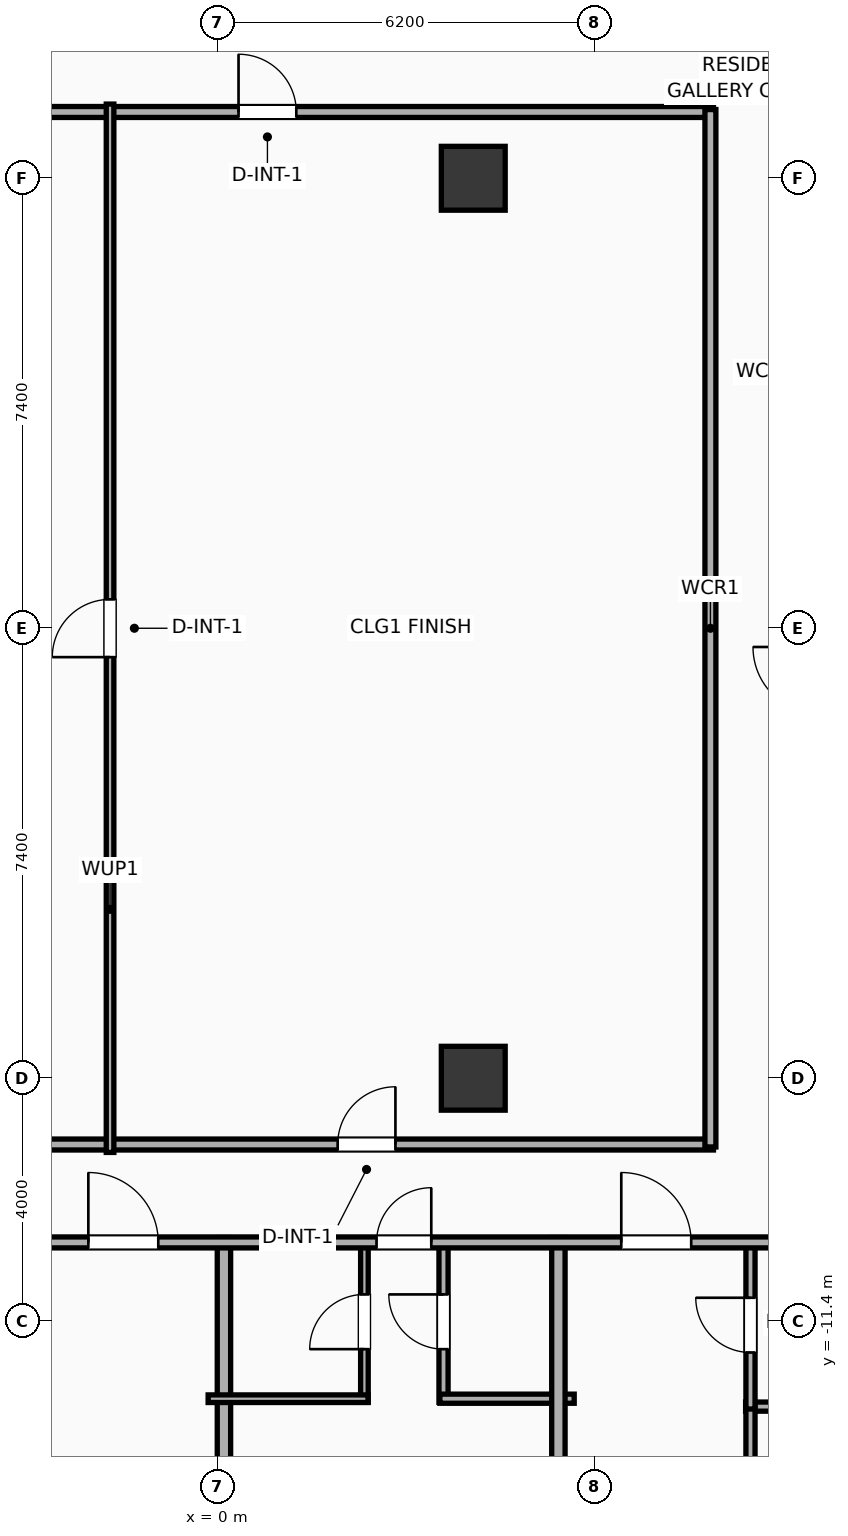
"""IFC4 building model, lengths in metres.
Left out: names, types, materials, properties, quantities, classifications, styles, units other than length and angle.
Written with IfcOpenShell. Run it as: python <this file> out.ifc"""

import sys

from ifc_helpers import new_model, si_unit, direction, frame, frame_2d, origin, origin_2d, place, context, subcontext, project, spatial, rectangle, extrude, element, fill, save


model = new_model("IFC4")
c1 = context("Model", 3, precision=1e-05, world=origin(), true_north=direction((0.0, 1.0)))
c2 = subcontext(c1, "Body", "Model", "MODEL_VIEW")
j1 = project(units=[si_unit("LENGTHUNIT", "METRE"), si_unit("PLANEANGLEUNIT", "RADIAN")], contexts=[c1])
p1 = place(None, origin())
s1 = spatial("IfcSite", under=j1, at=p1, CompositionType="ELEMENT")
p2 = place(p1, origin())
s2 = spatial("IfcBuilding", under=s1, at=p2, CompositionType="ELEMENT")
p3 = place(p2, frame((0.0, 0.0, 41.6)))
s3 = spatial("IfcBuildingStorey", under=s2, at=p3, CompositionType="ELEMENT", Elevation=41.6)
for number, where, z_axis, x_axis in (
    (1, (4.2, -7.4, 0.0), (0.0, 0.0, 1.0), (1.0, 0.0, 0.0)),
    (2, (4.2, 7.4, 0.0), (0.0, 0.0, 1.0), (1.0, 0.0, 0.0)),
):
    element("IfcColumn", number, at=place(p3, frame(where, z_axis=z_axis, x_axis=x_axis)), inside=s3, PredefinedType="COLUMN", context=c2, shape_type="SweptSolid", body=[
        extrude(rectangle(XDim=1.05, YDim=1.05, at=origin_2d()), origin(), (0.0, 0.0, 1.0), 3.9),
    ])
p4 = place(p3, frame((-8.15, 8.49, 0.0), z_axis=(0.0, 0.0, 1.0), x_axis=(1.0, 0.0, 0.0)))
e3 = element("IfcWall", 3, at=p4, inside=s3, PredefinedType="PARTITIONING", context=c2, shape_type="SweptSolid", body=[
    extrude(rectangle(XDim=16.3, YDim=0.18, at=frame_2d((8.15, 0.0))), origin(), (0.0, 0.0, 1.0), 3.65),
])
p5 = place(p4, frame((8.49, 0.0, 0.0)))
e4 = element("IfcOpeningElement", 4, at=p5, cuts=e3, PredefinedType="OPENING", context=c2, shape_type="SweptSolid", body=[
    extrude(rectangle(XDim=0.95, YDim=2.05, at=frame_2d((0.475, 1.025))), frame((0.0, 0.1, 0.0), z_axis=(0.0, -1.0, 0.0), x_axis=(1.0, 0.0, 0.0)), (0.0, 0.0, 1.0), 0.2),
])
p6 = place(p3, frame((-8.15, -8.49, 0.0), z_axis=(0.0, 0.0, 1.0), x_axis=(1.0, 0.0, 0.0)))
e5 = element("IfcWall", 5, at=p6, inside=s3, PredefinedType="PARTITIONING", context=c2, shape_type="SweptSolid", body=[
    extrude(rectangle(XDim=16.3, YDim=0.18, at=frame_2d((8.15, 0.0))), origin(), (0.0, 0.0, 1.0), 3.65),
])
p7 = place(p6, frame((1.13, 0.0, 0.0)))
e6 = element("IfcOpeningElement", 6, at=p7, cuts=e5, PredefinedType="OPENING", context=c2, shape_type="SweptSolid", body=[
    extrude(rectangle(XDim=1.0, YDim=2.05, at=frame_2d((0.5, 1.025))), frame((0.0, 0.1, 0.0), z_axis=(0.0, -1.0, 0.0), x_axis=(1.0, 0.0, 0.0)), (0.0, 0.0, 1.0), 0.2),
])
p8 = place(p6, frame((10.12, 0.0, 0.0)))
e7 = element("IfcOpeningElement", 7, at=p8, cuts=e5, PredefinedType="OPENING", context=c2, shape_type="SweptSolid", body=[
    extrude(rectangle(XDim=0.95, YDim=2.05, at=frame_2d((0.475, 1.025))), frame((0.0, 0.1, 0.0), z_axis=(0.0, -1.0, 0.0), x_axis=(1.0, 0.0, 0.0)), (0.0, 0.0, 1.0), 0.2),
])
p9 = place(p3, frame((8.1, -8.53, 0.0), z_axis=(0.0, 0.0, 1.0), x_axis=(0.0, 1.0, 0.0)))
e8 = element("IfcWall", 8, at=p9, inside=s3, PredefinedType="PARTITIONING", context=c2, shape_type="SweptSolid", body=[
    extrude(rectangle(XDim=17.06, YDim=0.18, at=frame_2d((8.53, 0.0))), origin(), (0.0, 0.0, 1.0), 3.65),
])
p10 = place(p3, frame((-1.773, -8.62, 0.0), z_axis=(0.0, 0.0, 1.0), x_axis=(0.0, 1.0, 0.0)))
e9 = element("IfcWall", 9, at=p10, inside=s3, PredefinedType="PARTITIONING", context=c2, shape_type="SweptSolid", body=[
    extrude(rectangle(XDim=17.24, YDim=0.125, at=frame_2d((8.62, 0.0))), origin(), (0.0, 0.0, 1.0), 3.65),
])
p11 = place(p10, frame((8.145, 0.0, 0.0)))
e10 = element("IfcOpeningElement", 10, at=p11, cuts=e9, PredefinedType="OPENING", context=c2, shape_type="SweptSolid", body=[
    extrude(rectangle(XDim=0.95, YDim=2.05, at=frame_2d((0.475, 1.025))), frame((0.0, 0.073, 0.0), z_axis=(0.0, -1.0, 0.0), x_axis=(1.0, 0.0, 0.0)), (0.0, 0.0, 1.0), 0.145),
])
p12 = place(p3, frame((0.1, -22.21, 0.0), z_axis=(0.0, 0.0, 1.0), x_axis=(0.0, 1.0, 0.0)))
e11 = element("IfcWall", 11, at=p12, inside=s3, PredefinedType="PARTITIONING", context=c2, shape_type="SweptSolid", body=[
    extrude(rectangle(XDim=12.19, YDim=0.22, at=frame_2d((6.095, 0.0))), origin(), (0.0, 0.0, 1.0), 3.65),
])
p13 = place(p3, frame((2.41, -12.73, 0.0), z_axis=(0.0, 0.0, 1.0), x_axis=(0.0, 1.0, 0.0)))
e12 = element("IfcWall", 12, at=p13, inside=s3, PredefinedType="PARTITIONING", context=c2, shape_type="SweptSolid", body=[
    extrude(rectangle(XDim=2.65, YDim=0.125, at=frame_2d((1.325, 0.0))), origin(), (0.0, 0.0, 1.0), 3.65),
])
p14 = place(p13, frame((0.875, 0.0, 0.0)))
e13 = element("IfcOpeningElement", 13, at=p14, cuts=e12, PredefinedType="OPENING", context=c2, shape_type="SweptSolid", body=[
    extrude(rectangle(XDim=0.9, YDim=2.05, at=frame_2d((0.45, 1.025))), frame((0.0, 0.073, 0.0), z_axis=(0.0, -1.0, 0.0), x_axis=(1.0, 0.0, 0.0)), (0.0, 0.0, 1.0), 0.145),
])
p15 = place(p3, frame((3.711, -12.73, 0.0), z_axis=(0.0, 0.0, 1.0), x_axis=(0.0, 1.0, 0.0)))
e14 = element("IfcWall", 14, at=p15, inside=s3, PredefinedType="PLUMBINGWALL", context=c2, shape_type="SweptSolid", body=[
    extrude(rectangle(XDim=2.65, YDim=0.15, at=frame_2d((1.325, 0.0))), origin(), (0.0, 0.0, 1.0), 2.94),
])
p16 = place(p15, frame((0.875, 0.0, 0.0)))
e15 = element("IfcOpeningElement", 15, at=p16, cuts=e14, PredefinedType="OPENING", context=c2, shape_type="SweptSolid", body=[
    extrude(rectangle(XDim=0.9, YDim=2.05, at=frame_2d((0.45, 1.025))), frame((0.0, 0.085, 0.0), z_axis=(0.0, -1.0, 0.0), x_axis=(1.0, 0.0, 0.0)), (0.0, 0.0, 1.0), 0.17),
])
p17 = place(p3, frame((-0.16, -12.67, 0.0), z_axis=(0.0, 0.0, 1.0), x_axis=(1.0, 0.0, 0.0)))
e16 = element("IfcWall", 16, at=p17, inside=s3, PredefinedType="PARTITIONING", context=c2, shape_type="SweptSolid", body=[
    extrude(rectangle(XDim=2.63, YDim=0.125, at=frame_2d((1.315, 0.0))), origin(), (0.0, 0.0, 1.0), 3.65),
])
p18 = place(p3, frame((3.651, -12.67, 0.0), z_axis=(0.0, 0.0, 1.0), x_axis=(1.0, 0.0, 0.0)))
e17 = element("IfcWall", 17, at=p18, inside=s3, PredefinedType="PLUMBINGWALL", context=c2, shape_type="SweptSolid", body=[
    extrude(rectangle(XDim=2.209, YDim=0.15, at=frame_2d((1.104, 0.0))), origin(), (0.0, 0.0, 1.0), 3.65),
])
p19 = place(p3, frame((5.6, -22.21, 0.0), z_axis=(0.0, 0.0, 1.0), x_axis=(0.0, 1.0, 0.0)))
e18 = element("IfcWall", 18, at=p19, inside=s3, PredefinedType="PARTITIONING", context=c2, shape_type="SweptSolid", body=[
    extrude(rectangle(XDim=12.19, YDim=0.22, at=frame_2d((6.095, 0.0))), origin(), (0.0, 0.0, 1.0), 3.65),
])
p20 = place(p3, frame((8.679, -12.8, 0.0), z_axis=(0.0, 0.0, 1.0), x_axis=(1.0, 0.0, 0.0)))
e19 = element("IfcWall", 19, at=p20, inside=s3, PredefinedType="PLUMBINGWALL", context=c2, shape_type="SweptSolid", body=[
    extrude(rectangle(XDim=2.681, YDim=0.15, at=frame_2d((1.341, 0.0))), origin(), (0.0, 0.0, 1.0), 3.65),
])
p21 = place(p3, frame((8.759, -22.258, 0.0), z_axis=(0.0, 0.0, 1.0), x_axis=(0.0, 1.0, 0.0)))
e20 = element("IfcWall", 20, at=p21, inside=s3, PredefinedType="PLUMBINGWALL", context=c2, shape_type="SweptSolid", body=[
    extrude(rectangle(XDim=9.498, YDim=0.15, at=frame_2d((4.749, 0.0))), origin(), (0.0, 0.0, 1.0), 3.65),
])
p22 = place(p21, frame((7.338, 0.0, 0.0)))
e21 = element("IfcOpeningElement", 21, at=p22, cuts=e20, PredefinedType="OPENING", context=c2, shape_type="SweptSolid", body=[
    extrude(rectangle(XDim=0.9, YDim=2.05, at=frame_2d((0.45, 1.025))), frame((0.0, 0.085, 0.0), z_axis=(0.0, -1.0, 0.0), x_axis=(1.0, 0.0, 0.0)), (0.0, 0.0, 1.0), 0.17),
])
p23 = place(p3, frame((8.759, -12.84, 0.0), z_axis=(0.0, 0.0, 1.0), x_axis=(0.0, 1.0, 0.0)))
e22 = element("IfcWall", 22, at=p23, inside=s3, PredefinedType="PLUMBINGWALL", context=c2, shape_type="SweptSolid", body=[
    extrude(rectangle(XDim=2.76, YDim=0.15, at=frame_2d((1.38, 0.0))), origin(), (0.0, 0.0, 1.0), 3.65),
])
p24 = place(p23, frame((0.93, 0.0, 0.0)))
e23 = element("IfcOpeningElement", 23, at=p24, cuts=e22, PredefinedType="OPENING", context=c2, shape_type="SweptSolid", body=[
    extrude(rectangle(XDim=0.9, YDim=2.05, at=frame_2d((0.45, 1.025))), frame((0.0, 0.085, 0.0), z_axis=(0.0, -1.0, 0.0), x_axis=(1.0, 0.0, 0.0)), (0.0, 0.0, 1.0), 0.17),
])
p25 = place(p3, frame((-33.41, -10.1, 0.0), z_axis=(0.0, 0.0, 1.0), x_axis=(1.0, 0.0, 0.0)))
e24 = element("IfcWall", 24, at=p25, inside=s3, PredefinedType="PARTITIONING", context=c2, shape_type="SweptSolid", body=[
    extrude(rectangle(XDim=59.62, YDim=0.18, at=frame_2d((29.81, 0.0))), origin(), (0.0, 0.0, 1.0), 3.65),
])
p26 = place(p25, frame((2.746, 0.0, 0.0)))
e25 = element("IfcOpeningElement", 25, at=p26, cuts=e24, PredefinedType="OPENING", context=c2, shape_type="SweptSolid", body=[
    extrude(rectangle(XDim=0.9, YDim=2.05, at=frame_2d((0.45, 1.025))), frame((0.0, 0.1, 0.0), z_axis=(0.0, -1.0, 0.0), x_axis=(1.0, 0.0, 0.0)), (0.0, 0.0, 1.0), 0.2),
])
p27 = place(p25, frame((11.552, 0.0, 0.0)))
e26 = element("IfcOpeningElement", 26, at=p27, cuts=e24, PredefinedType="OPENING", context=c2, shape_type="SweptSolid", body=[
    extrude(rectangle(XDim=1.15, YDim=2.05, at=frame_2d((0.575, 1.025))), frame((0.0, 0.1, 0.0), z_axis=(0.0, -1.0, 0.0), x_axis=(1.0, 0.0, 0.0)), (0.0, 0.0, 1.0), 0.2),
])
p28 = place(p25, frame((22.379, 0.0, 0.0)))
e27 = element("IfcOpeningElement", 27, at=p28, cuts=e24, PredefinedType="OPENING", context=c2, shape_type="SweptSolid", body=[
    extrude(rectangle(XDim=1.15, YDim=2.05, at=frame_2d((0.575, 1.025))), frame((0.0, 0.1, 0.0), z_axis=(0.0, -1.0, 0.0), x_axis=(1.0, 0.0, 0.0)), (0.0, 0.0, 1.0), 0.2),
])
p29 = place(p25, frame((31.28, 0.0, 0.0)))
e28 = element("IfcOpeningElement", 28, at=p29, cuts=e24, PredefinedType="OPENING", context=c2, shape_type="SweptSolid", body=[
    extrude(rectangle(XDim=1.15, YDim=2.05, at=frame_2d((0.575, 1.025))), frame((0.0, 0.1, 0.0), z_axis=(0.0, -1.0, 0.0), x_axis=(1.0, 0.0, 0.0)), (0.0, 0.0, 1.0), 0.2),
])
p30 = place(p25, frame((36.02, 0.0, 0.0)))
e29 = element("IfcOpeningElement", 29, at=p30, cuts=e24, PredefinedType="OPENING", context=c2, shape_type="SweptSolid", body=[
    extrude(rectangle(XDim=0.9, YDim=2.05, at=frame_2d((0.45, 1.025))), frame((0.0, 0.1, 0.0), z_axis=(0.0, -1.0, 0.0), x_axis=(1.0, 0.0, 0.0)), (0.0, 0.0, 1.0), 0.2),
])
p31 = place(p25, frame((40.044, 0.0, 0.0)))
e30 = element("IfcOpeningElement", 30, at=p31, cuts=e24, PredefinedType="OPENING", context=c2, shape_type="SweptSolid", body=[
    extrude(rectangle(XDim=1.15, YDim=2.05, at=frame_2d((0.575, 1.025))), frame((0.0, 0.1, 0.0), z_axis=(0.0, -1.0, 0.0), x_axis=(1.0, 0.0, 0.0)), (0.0, 0.0, 1.0), 0.2),
])
p32 = place(p25, frame((45.613, 0.0, 0.0)))
e31 = element("IfcOpeningElement", 31, at=p32, cuts=e24, PredefinedType="OPENING", context=c2, shape_type="SweptSolid", body=[
    extrude(rectangle(XDim=1.15, YDim=2.05, at=frame_2d((0.575, 1.025))), frame((0.0, 0.1, 0.0), z_axis=(0.0, -1.0, 0.0), x_axis=(1.0, 0.0, 0.0)), (0.0, 0.0, 1.0), 0.2),
])
p33 = place(p25, frame((54.174, 0.0, 0.0)))
e32 = element("IfcOpeningElement", 32, at=p33, cuts=e24, PredefinedType="OPENING", context=c2, shape_type="SweptSolid", body=[
    extrude(rectangle(XDim=1.15, YDim=2.05, at=frame_2d((0.575, 1.025))), frame((0.0, 0.1, 0.0), z_axis=(0.0, -1.0, 0.0), x_axis=(1.0, 0.0, 0.0)), (0.0, 0.0, 1.0), 0.2),
])
p34 = place(p5, origin())
e33 = element("IfcDoor", 33, at=p34, inside=s3, OperationType="SINGLE_SWING_LEFT", PredefinedType="DOOR", context=c2, shape_type="SweptSolid", body=[
    extrude(rectangle(XDim=0.95, YDim=2.05, at=frame_2d((0.475, 1.025))), frame((0.0, 0.025, 0.0), z_axis=(0.0, -1.0, 0.0), x_axis=(1.0, 0.0, 0.0)), (0.0, 0.0, 1.0), 0.05),
])
fill(e4, e33)
p35 = place(p8, origin())
e34 = element("IfcDoor", 34, at=p35, inside=s3, OperationType="SINGLE_SWING_RIGHT", PredefinedType="DOOR", context=c2, shape_type="SweptSolid", body=[
    extrude(rectangle(XDim=0.95, YDim=2.05, at=frame_2d((0.475, 1.025))), frame((0.0, 0.025, 0.0), z_axis=(0.0, -1.0, 0.0), x_axis=(1.0, 0.0, 0.0)), (0.0, 0.0, 1.0), 0.05),
])
fill(e7, e34)
p36 = place(p11, origin())
e35 = element("IfcDoor", 35, at=p36, inside=s3, OperationType="SINGLE_SWING_LEFT", PredefinedType="DOOR", context=c2, shape_type="SweptSolid", body=[
    extrude(rectangle(XDim=0.95, YDim=2.05, at=frame_2d((0.475, 1.025))), frame((0.0, 0.025, 0.0), z_axis=(0.0, -1.0, 0.0), x_axis=(1.0, 0.0, 0.0)), (0.0, 0.0, 1.0), 0.05),
])
fill(e10, e35)
p37 = place(p14, origin())
e36 = element("IfcDoor", 36, at=p37, inside=s3, OperationType="SINGLE_SWING_LEFT", PredefinedType="DOOR", context=c2, shape_type="SweptSolid", body=[
    extrude(rectangle(XDim=0.9, YDim=2.05, at=frame_2d((0.45, 1.025))), frame((0.0, 0.025, 0.0), z_axis=(0.0, -1.0, 0.0), x_axis=(1.0, 0.0, 0.0)), (0.0, 0.0, 1.0), 0.05),
])
fill(e13, e36)
p38 = place(p16, origin())
e37 = element("IfcDoor", 37, at=p38, inside=s3, OperationType="SINGLE_SWING_RIGHT", PredefinedType="DOOR", context=c2, shape_type="SweptSolid", body=[
    extrude(rectangle(XDim=0.9, YDim=2.05, at=frame_2d((0.45, 1.025))), frame((0.0, 0.025, 0.0), z_axis=(0.0, -1.0, 0.0), x_axis=(1.0, 0.0, 0.0)), (0.0, 0.0, 1.0), 0.05),
])
fill(e15, e37)
p39 = place(p24, origin())
e38 = element("IfcDoor", 38, at=p39, inside=s3, OperationType="SINGLE_SWING_RIGHT", PredefinedType="DOOR", context=c2, shape_type="SweptSolid", body=[
    extrude(rectangle(XDim=0.9, YDim=2.05, at=frame_2d((0.45, 1.025))), frame((0.0, 0.025, 0.0), z_axis=(0.0, -1.0, 0.0), x_axis=(1.0, 0.0, 0.0)), (0.0, 0.0, 1.0), 0.05),
])
fill(e23, e38)
p40 = place(p29, origin())
e39 = element("IfcDoor", 39, at=p40, inside=s3, OperationType="SINGLE_SWING_LEFT", PredefinedType="DOOR", context=c2, shape_type="SweptSolid", body=[
    extrude(rectangle(XDim=1.15, YDim=2.05, at=frame_2d((0.575, 1.025))), frame((0.0, 0.025, 0.0), z_axis=(0.0, -1.0, 0.0), x_axis=(1.0, 0.0, 0.0)), (0.0, 0.0, 1.0), 0.05),
])
fill(e28, e39)
p41 = place(p30, origin())
e40 = element("IfcDoor", 40, at=p41, inside=s3, OperationType="SINGLE_SWING_RIGHT", PredefinedType="DOOR", context=c2, shape_type="SweptSolid", body=[
    extrude(rectangle(XDim=0.9, YDim=2.05, at=frame_2d((0.45, 1.025))), frame((0.0, 0.025, 0.0), z_axis=(0.0, -1.0, 0.0), x_axis=(1.0, 0.0, 0.0)), (0.0, 0.0, 1.0), 0.05),
])
fill(e29, e40)
p42 = place(p31, origin())
e41 = element("IfcDoor", 41, at=p42, inside=s3, OperationType="SINGLE_SWING_LEFT", PredefinedType="DOOR", context=c2, shape_type="SweptSolid", body=[
    extrude(rectangle(XDim=1.15, YDim=2.05, at=frame_2d((0.575, 1.025))), frame((0.0, 0.025, 0.0), z_axis=(0.0, -1.0, 0.0), x_axis=(1.0, 0.0, 0.0)), (0.0, 0.0, 1.0), 0.05),
])
fill(e30, e41)
save(model, sys.argv[1])
